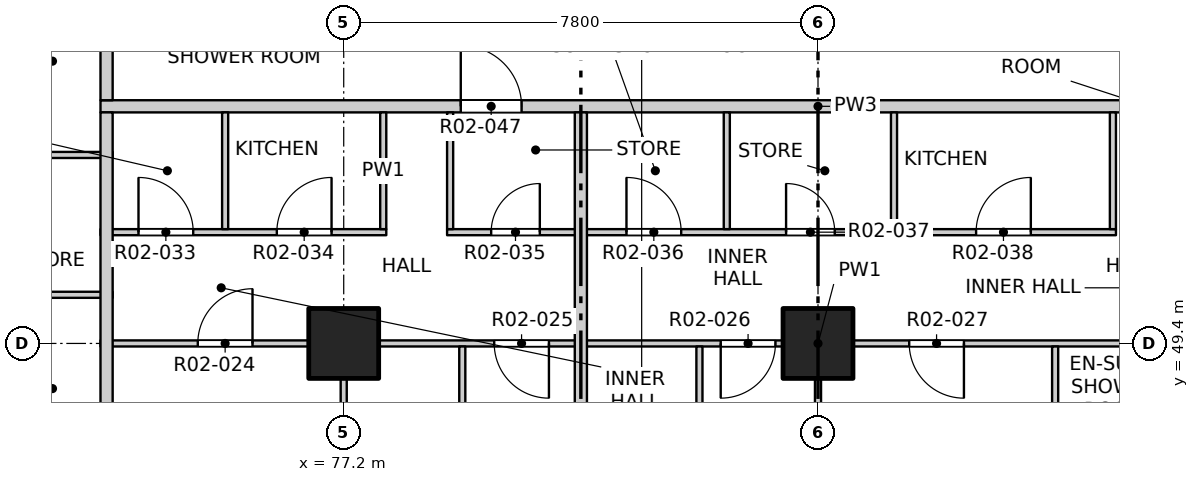
"""IFC4 building model, lengths in metres.
Left out: names, types, materials, properties, quantities, classifications, styles, units other than length and angle.
Written with IfcOpenShell. Run it as: python <this file> out.ifc"""

import sys

from ifc_helpers import new_model, si_unit, direction, frame, frame_2d, origin, origin_2d, place, context, subcontext, project, spatial, rectangle, extrude, element, fill, save


model = new_model("IFC4")
c1 = context("Model", 3, precision=1e-05, world=origin(), true_north=direction((0.0, 1.0)))
c2 = subcontext(c1, "Body", "Model", "MODEL_VIEW")
j1 = project(units=[si_unit("LENGTHUNIT", "METRE"), si_unit("PLANEANGLEUNIT", "RADIAN")], contexts=[c1])
p1 = place(None, origin())
s1 = spatial("IfcSite", under=j1, at=p1, CompositionType="ELEMENT")
p2 = place(p1, origin())
s2 = spatial("IfcBuilding", under=s1, at=p2, CompositionType="ELEMENT")
p3 = place(p2, frame((0.0, 0.0, 29.7)))
s3 = spatial("IfcBuildingStorey", under=s2, at=p3, CompositionType="ELEMENT", Elevation=29.7)
for number, where, z_axis, x_axis in (
    (1, (77.2, 49.4, -0.25), (0.0, 0.0, 1.0), (1.0, 0.0, 0.0)),
    (2, (85.0, 49.4, -0.25), (0.0, 0.0, 1.0), (1.0, 0.0, 0.0)),
):
    element("IfcColumn", number, at=place(p3, frame(where, z_axis=z_axis, x_axis=x_axis)), inside=s3, PredefinedType="COLUMN", context=c2, shape_type="SweptSolid", body=[
        extrude(rectangle(XDim=1.15, YDim=1.15, at=origin_2d()), origin(), (0.0, 0.0, 1.0), 3.4),
    ])
p4 = place(p3, frame((73.2, 49.4, 0.0), z_axis=(0.0, 0.0, 1.0), x_axis=(1.0, 0.0, 0.0)))
e3 = element("IfcWall", 3, at=p4, inside=s3, PredefinedType="PARTITIONING", context=c2, shape_type="SweptSolid", body=[
    extrude(rectangle(XDim=23.6, YDim=0.1, at=frame_2d((11.8, 0.0))), origin(), (0.0, 0.0, 1.0), 3.15),
])
p5 = place(p4, frame((1.6, 0.0, 0.0)))
e4 = element("IfcOpeningElement", 4, at=p5, cuts=e3, PredefinedType="OPENING", context=c2, shape_type="SweptSolid", body=[
    extrude(rectangle(XDim=0.9, YDim=2.1, at=frame_2d((0.45, 1.05))), frame((0.0, 0.06, 0.0), z_axis=(0.0, -1.0, 0.0), x_axis=(1.0, 0.0, 0.0)), (0.0, 0.0, 1.0), 0.12),
])
p6 = place(p4, frame((6.475, 0.0, 0.0)))
e5 = element("IfcOpeningElement", 5, at=p6, cuts=e3, PredefinedType="OPENING", context=c2, shape_type="SweptSolid", body=[
    extrude(rectangle(XDim=0.9, YDim=2.1, at=frame_2d((0.45, 1.05))), frame((0.0, 0.06, 0.0), z_axis=(0.0, -1.0, 0.0), x_axis=(1.0, 0.0, 0.0)), (0.0, 0.0, 1.0), 0.12),
])
p7 = place(p4, frame((10.2, 0.0, 0.0)))
e6 = element("IfcOpeningElement", 6, at=p7, cuts=e3, PredefinedType="OPENING", context=c2, shape_type="SweptSolid", body=[
    extrude(rectangle(XDim=0.9, YDim=2.1, at=frame_2d((0.45, 1.05))), frame((0.0, 0.06, 0.0), z_axis=(0.0, -1.0, 0.0), x_axis=(1.0, 0.0, 0.0)), (0.0, 0.0, 1.0), 0.12),
])
p8 = place(p4, frame((13.3, 0.0, 0.0)))
e7 = element("IfcOpeningElement", 7, at=p8, cuts=e3, PredefinedType="OPENING", context=c2, shape_type="SweptSolid", body=[
    extrude(rectangle(XDim=0.9, YDim=2.1, at=frame_2d((0.45, 1.05))), frame((0.0, 0.06, 0.0), z_axis=(0.0, -1.0, 0.0), x_axis=(1.0, 0.0, 0.0)), (0.0, 0.0, 1.0), 0.12),
])
p9 = place(p4, frame((18.0, 0.0, 0.0)))
e8 = element("IfcOpeningElement", 8, at=p9, cuts=e3, PredefinedType="OPENING", context=c2, shape_type="SweptSolid", body=[
    extrude(rectangle(XDim=0.9, YDim=2.1, at=frame_2d((0.45, 1.05))), frame((0.0, 0.06, 0.0), z_axis=(0.0, -1.0, 0.0), x_axis=(1.0, 0.0, 0.0)), (0.0, 0.0, 1.0), 0.12),
])
p10 = place(p4, frame((21.1, 0.0, 0.0)))
e9 = element("IfcOpeningElement", 9, at=p10, cuts=e3, PredefinedType="OPENING", context=c2, shape_type="SweptSolid", body=[
    extrude(rectangle(XDim=0.9, YDim=2.1, at=frame_2d((0.45, 1.05))), frame((0.0, 0.06, 0.0), z_axis=(0.0, -1.0, 0.0), x_axis=(1.0, 0.0, 0.0)), (0.0, 0.0, 1.0), 0.12),
])
p11 = place(p3, frame((71.18, 50.2, 0.0), z_axis=(0.0, 0.0, 1.0), x_axis=(1.0, 0.0, 0.0)))
e10 = element("IfcWall", 10, at=p11, inside=s3, PredefinedType="PARTITIONING", context=c2, shape_type="SweptSolid", body=[
    extrude(rectangle(XDim=2.22, YDim=0.1, at=frame_2d((1.11, 0.0))), origin(), (0.0, 0.0, 1.0), 3.15),
])
p12 = place(p3, frame((73.2, 51.23, 0.0), z_axis=(0.0, 0.0, 1.0), x_axis=(1.0, 0.0, 0.0)))
e11 = element("IfcWall", 11, at=p12, inside=s3, PredefinedType="PARTITIONING", context=c2, shape_type="SweptSolid", body=[
    extrude(rectangle(XDim=4.7, YDim=0.1, at=frame_2d((2.35, 0.0))), origin(), (0.0, 0.0, 1.0), 3.15),
])
p13 = place(p12, frame((0.625, 0.0, 0.0)))
e12 = element("IfcOpeningElement", 12, at=p13, cuts=e11, PredefinedType="OPENING", context=c2, shape_type="SweptSolid", body=[
    extrude(rectangle(XDim=0.9, YDim=2.1, at=frame_2d((0.45, 1.05))), frame((0.0, 0.06, 0.0), z_axis=(0.0, -1.0, 0.0), x_axis=(1.0, 0.0, 0.0)), (0.0, 0.0, 1.0), 0.12),
])
p14 = place(p12, frame((2.9, 0.0, 0.0)))
e13 = element("IfcOpeningElement", 13, at=p14, cuts=e11, PredefinedType="OPENING", context=c2, shape_type="SweptSolid", body=[
    extrude(rectangle(XDim=0.9, YDim=2.1, at=frame_2d((0.45, 1.05))), frame((0.0, 0.06, 0.0), z_axis=(0.0, -1.0, 0.0), x_axis=(1.0, 0.0, 0.0)), (0.0, 0.0, 1.0), 0.12),
])
p15 = place(p3, frame((78.9, 51.23, 0.0), z_axis=(0.0, 0.0, 1.0), x_axis=(1.0, 0.0, 0.0)))
e14 = element("IfcWall", 14, at=p15, inside=s3, PredefinedType="PARTITIONING", context=c2, shape_type="SweptSolid", body=[
    extrude(rectangle(XDim=11.0, YDim=0.1, at=frame_2d((5.5, 0.0))), origin(), (0.0, 0.0, 1.0), 3.15),
])
p16 = place(p15, frame((0.725, 0.0, 0.0)))
e15 = element("IfcOpeningElement", 15, at=p16, cuts=e14, PredefinedType="OPENING", context=c2, shape_type="SweptSolid", body=[
    extrude(rectangle(XDim=0.8, YDim=2.1, at=frame_2d((0.4, 1.05))), frame((0.0, 0.06, 0.0), z_axis=(0.0, -1.0, 0.0), x_axis=(1.0, 0.0, 0.0)), (0.0, 0.0, 1.0), 0.12),
])
p17 = place(p15, frame((2.95, 0.0, 0.0)))
e16 = element("IfcOpeningElement", 16, at=p17, cuts=e14, PredefinedType="OPENING", context=c2, shape_type="SweptSolid", body=[
    extrude(rectangle(XDim=0.9, YDim=2.1, at=frame_2d((0.45, 1.05))), frame((0.0, 0.06, 0.0), z_axis=(0.0, -1.0, 0.0), x_axis=(1.0, 0.0, 0.0)), (0.0, 0.0, 1.0), 0.12),
])
p18 = place(p15, frame((5.575, 0.0, 0.0)))
e17 = element("IfcOpeningElement", 17, at=p18, cuts=e14, PredefinedType="OPENING", context=c2, shape_type="SweptSolid", body=[
    extrude(rectangle(XDim=0.8, YDim=2.1, at=frame_2d((0.4, 1.05))), frame((0.0, 0.06, 0.0), z_axis=(0.0, -1.0, 0.0), x_axis=(1.0, 0.0, 0.0)), (0.0, 0.0, 1.0), 0.12),
])
p19 = place(p15, frame((8.7, 0.0, 0.0)))
e18 = element("IfcOpeningElement", 18, at=p19, cuts=e14, PredefinedType="OPENING", context=c2, shape_type="SweptSolid", body=[
    extrude(rectangle(XDim=0.9, YDim=2.1, at=frame_2d((0.45, 1.05))), frame((0.0, 0.06, 0.0), z_axis=(0.0, -1.0, 0.0), x_axis=(1.0, 0.0, 0.0)), (0.0, 0.0, 1.0), 0.12),
])
p20 = place(p3, frame((71.18, 52.5, 0.0), z_axis=(0.0, 0.0, 1.0), x_axis=(1.0, 0.0, 0.0)))
e19 = element("IfcWall", 19, at=p20, inside=s3, PredefinedType="PARTITIONING", context=c2, shape_type="SweptSolid", body=[
    extrude(rectangle(XDim=2.22, YDim=0.1, at=frame_2d((1.11, 0.0))), origin(), (0.0, 0.0, 1.0), 3.15),
])
p21 = place(p3, frame((73.2, 53.3, 0.0), z_axis=(0.0, 0.0, 1.0), x_axis=(1.0, 0.0, 0.0)))
e20 = element("IfcWall", 20, at=p21, inside=s3, PredefinedType="PARTITIONING", context=c2, shape_type="SweptSolid", body=[
    extrude(rectangle(XDim=23.6, YDim=0.2, at=frame_2d((11.8, 0.0))), origin(), (0.0, 0.0, 1.0), 3.15),
])
p22 = place(p21, frame((5.925, 0.0, 0.0)))
e21 = element("IfcOpeningElement", 21, at=p22, cuts=e20, PredefinedType="OPENING", context=c2, shape_type="SweptSolid", body=[
    extrude(rectangle(XDim=1.0, YDim=2.1, at=frame_2d((0.5, 1.05))), frame((0.0, 0.11, 0.0), z_axis=(0.0, -1.0, 0.0), x_axis=(1.0, 0.0, 0.0)), (0.0, 0.0, 1.0), 0.22),
])
p23 = place(p21, frame((17.925, 0.0, 0.0)))
e22 = element("IfcOpeningElement", 22, at=p23, cuts=e20, PredefinedType="OPENING", context=c2, shape_type="SweptSolid", body=[
    extrude(rectangle(XDim=1.0, YDim=2.1, at=frame_2d((0.5, 1.05))), frame((0.0, 0.11, 0.0), z_axis=(0.0, -1.0, 0.0), x_axis=(1.0, 0.0, 0.0)), (0.0, 0.0, 1.0), 0.22),
])
p24 = place(p3, frame((73.3, 41.9, 0.0), z_axis=(0.0, 0.0, 1.0), x_axis=(0.0, 1.0, 0.0)))
e23 = element("IfcWall", 23, at=p24, inside=s3, PredefinedType="PARTITIONING", context=c2, shape_type="SweptSolid", body=[
    extrude(rectangle(XDim=11.3, YDim=0.2, at=frame_2d((5.65, 0.0))), origin(), (0.0, 0.0, 1.0), 3.15),
])
p25 = place(p3, frame((73.3, 53.4, 0.0), z_axis=(0.0, 0.0, 1.0), x_axis=(0.0, 1.0, 0.0)))
e24 = element("IfcWall", 24, at=p25, inside=s3, PredefinedType="PARTITIONING", context=c2, shape_type="SweptSolid", body=[
    extrude(rectangle(XDim=31.0, YDim=0.2, at=frame_2d((15.5, 0.0))), origin(), (0.0, 0.0, 1.0), 3.15),
])
p26 = place(p25, frame((2.675, 0.0, 0.0)))
e25 = element("IfcOpeningElement", 25, at=p26, cuts=e24, PredefinedType="OPENING", context=c2, shape_type="SweptSolid", body=[
    extrude(rectangle(XDim=1.0, YDim=2.1, at=frame_2d((0.5, 1.05))), frame((0.0, 0.11, 0.0), z_axis=(0.0, -1.0, 0.0), x_axis=(1.0, 0.0, 0.0)), (0.0, 0.0, 1.0), 0.22),
])
p27 = place(p25, frame((18.125, 0.0, 0.0)))
e26 = element("IfcOpeningElement", 26, at=p27, cuts=e24, PredefinedType="OPENING", context=c2, shape_type="SweptSolid", body=[
    extrude(rectangle(XDim=1.0, YDim=2.1, at=frame_2d((0.5, 1.05))), frame((0.0, 0.11, 0.0), z_axis=(0.0, -1.0, 0.0), x_axis=(1.0, 0.0, 0.0)), (0.0, 0.0, 1.0), 0.22),
])
p28 = place(p25, frame((26.025, 0.0, 0.0)))
e27 = element("IfcOpeningElement", 27, at=p28, cuts=e24, PredefinedType="OPENING", context=c2, shape_type="SweptSolid", body=[
    extrude(rectangle(XDim=1.0, YDim=2.1, at=frame_2d((0.5, 1.05))), frame((0.0, 0.11, 0.0), z_axis=(0.0, -1.0, 0.0), x_axis=(1.0, 0.0, 0.0)), (0.0, 0.0, 1.0), 0.22),
])
p29 = place(p3, frame((75.25, 51.28, 0.0), z_axis=(0.0, 0.0, 1.0), x_axis=(0.0, 1.0, 0.0)))
e28 = element("IfcWall", 28, at=p29, inside=s3, PredefinedType="PARTITIONING", context=c2, shape_type="SweptSolid", body=[
    extrude(rectangle(XDim=1.92, YDim=0.1, at=frame_2d((0.96, 0.0))), origin(), (0.0, 0.0, 1.0), 3.15),
])
p30 = place(p3, frame((77.2, 41.9, 0.0), z_axis=(0.0, 0.0, 1.0), x_axis=(0.0, 1.0, 0.0)))
e29 = element("IfcWall", 29, at=p30, inside=s3, PredefinedType="PARTITIONING", context=c2, shape_type="SweptSolid", body=[
    extrude(rectangle(XDim=7.45, YDim=0.1, at=frame_2d((3.725, 0.0))), origin(), (0.0, 0.0, 1.0), 2.55),
])
for number, where, z_axis, x_axis in (
    (30, (77.85, 51.28, 0.0), (0.0, 0.0, 1.0), (0.0, 1.0, 0.0)),
    (31, (78.95, 51.28, 0.0), (0.0, 0.0, 1.0), (0.0, 1.0, 0.0)),
):
    element("IfcWall", number, at=place(p3, frame(where, z_axis=z_axis, x_axis=x_axis)), inside=s3, PredefinedType="PARTITIONING", context=c2, shape_type="SweptSolid", body=[
        extrude(rectangle(XDim=1.92, YDim=0.1, at=frame_2d((0.96, 0.0))), origin(), (0.0, 0.0, 1.0), 3.15),
    ])
p31 = place(p3, frame((79.15, 45.85, 0.0), z_axis=(0.0, 0.0, 1.0), x_axis=(0.0, 1.0, 0.0)))
e32 = element("IfcWall", 32, at=p31, inside=s3, PredefinedType="PARTITIONING", context=c2, shape_type="SweptSolid", body=[
    extrude(rectangle(XDim=3.5, YDim=0.1, at=frame_2d((1.75, 0.0))), origin(), (0.0, 0.0, 1.0), 3.15),
])
p32 = place(p3, frame((81.1, 41.9, 0.0), z_axis=(0.0, 0.0, 1.0), x_axis=(0.0, 1.0, 0.0)))
e33 = element("IfcWall", 33, at=p32, inside=s3, PredefinedType="PARTITIONING", context=c2, shape_type="SweptSolid", body=[
    extrude(rectangle(XDim=11.3, YDim=0.2, at=frame_2d((5.65, 0.0))), origin(), (0.0, 0.0, 1.0), 3.15),
])
p33 = place(p3, frame((83.05, 46.0, 0.0), z_axis=(0.0, 0.0, 1.0), x_axis=(0.0, 1.0, 0.0)))
e34 = element("IfcWall", 34, at=p33, inside=s3, PredefinedType="PARTITIONING", context=c2, shape_type="SweptSolid", body=[
    extrude(rectangle(XDim=3.35, YDim=0.1, at=frame_2d((1.675, 0.0))), origin(), (0.0, 0.0, 1.0), 3.15),
])
p34 = place(p3, frame((83.5, 51.28, 0.0), z_axis=(0.0, 0.0, 1.0), x_axis=(0.0, 1.0, 0.0)))
e35 = element("IfcWall", 35, at=p34, inside=s3, PredefinedType="PARTITIONING", context=c2, shape_type="SweptSolid", body=[
    extrude(rectangle(XDim=1.92, YDim=0.1, at=frame_2d((0.96, 0.0))), origin(), (0.0, 0.0, 1.0), 3.15),
])
p35 = place(p3, frame((85.0, 41.9, 0.0), z_axis=(0.0, 0.0, 1.0), x_axis=(0.0, 1.0, 0.0)))
e36 = element("IfcWall", 36, at=p35, inside=s3, PredefinedType="PARTITIONING", context=c2, shape_type="SweptSolid", body=[
    extrude(rectangle(XDim=7.45, YDim=0.1, at=frame_2d((3.725, 0.0))), origin(), (0.0, 0.0, 1.0), 2.55),
])
p36 = place(p3, frame((86.25, 51.28, 0.0), z_axis=(0.0, 0.0, 1.0), x_axis=(0.0, 1.0, 0.0)))
e37 = element("IfcWall", 37, at=p36, inside=s3, PredefinedType="PARTITIONING", context=c2, shape_type="SweptSolid", body=[
    extrude(rectangle(XDim=1.92, YDim=0.1, at=frame_2d((0.96, 0.0))), origin(), (0.0, 0.0, 1.0), 3.15),
])
p37 = place(p3, frame((88.9, 41.9, 0.0), z_axis=(0.0, 0.0, 1.0), x_axis=(0.0, 1.0, 0.0)))
e38 = element("IfcWall", 38, at=p37, inside=s3, PredefinedType="PARTITIONING", context=c2, shape_type="SweptSolid", body=[
    extrude(rectangle(XDim=7.45, YDim=0.1, at=frame_2d((3.725, 0.0))), origin(), (0.0, 0.0, 1.0), 3.15),
])
p38 = place(p3, frame((89.85, 51.28, 0.0), z_axis=(0.0, 0.0, 1.0), x_axis=(0.0, 1.0, 0.0)))
e39 = element("IfcWall", 39, at=p38, inside=s3, PredefinedType="PARTITIONING", context=c2, shape_type="SweptSolid", body=[
    extrude(rectangle(XDim=1.92, YDim=0.1, at=frame_2d((0.96, 0.0))), origin(), (0.0, 0.0, 1.0), 3.15),
])
p39 = place(p5, origin())
e40 = element("IfcDoor", 40, at=p39, inside=s3, OperationType="SINGLE_SWING_RIGHT", PredefinedType="DOOR", context=c2, shape_type="SweptSolid", body=[
    extrude(rectangle(XDim=0.9, YDim=2.1, at=frame_2d((0.45, 1.05))), frame((0.0, 0.025, 0.0), z_axis=(0.0, -1.0, 0.0), x_axis=(1.0, 0.0, 0.0)), (0.0, 0.0, 1.0), 0.05),
])
fill(e4, e40)
p40 = place(p6, origin())
e41 = element("IfcDoor", 41, at=p40, inside=s3, OperationType="SINGLE_SWING_LEFT", PredefinedType="DOOR", context=c2, shape_type="SweptSolid", body=[
    extrude(rectangle(XDim=0.9, YDim=2.1, at=frame_2d((0.45, 1.05))), frame((0.0, 0.025, 0.0), z_axis=(0.0, -1.0, 0.0), x_axis=(1.0, 0.0, 0.0)), (0.0, 0.0, 1.0), 0.05),
])
fill(e5, e41)
p41 = place(p7, origin())
e42 = element("IfcDoor", 42, at=p41, inside=s3, OperationType="SINGLE_SWING_RIGHT", PredefinedType="DOOR", context=c2, shape_type="SweptSolid", body=[
    extrude(rectangle(XDim=0.9, YDim=2.1, at=frame_2d((0.45, 1.05))), frame((0.0, 0.025, 0.0), z_axis=(0.0, -1.0, 0.0), x_axis=(1.0, 0.0, 0.0)), (0.0, 0.0, 1.0), 0.05),
])
fill(e6, e42)
p42 = place(p8, origin())
e43 = element("IfcDoor", 43, at=p42, inside=s3, OperationType="SINGLE_SWING_LEFT", PredefinedType="DOOR", context=c2, shape_type="SweptSolid", body=[
    extrude(rectangle(XDim=0.9, YDim=2.1, at=frame_2d((0.45, 1.05))), frame((0.0, 0.025, 0.0), z_axis=(0.0, -1.0, 0.0), x_axis=(1.0, 0.0, 0.0)), (0.0, 0.0, 1.0), 0.05),
])
fill(e7, e43)
p43 = place(p13, origin())
e44 = element("IfcDoor", 44, at=p43, inside=s3, OperationType="SINGLE_SWING_LEFT", PredefinedType="DOOR", context=c2, shape_type="SweptSolid", body=[
    extrude(rectangle(XDim=0.9, YDim=2.1, at=frame_2d((0.45, 1.05))), frame((0.0, 0.025, 0.0), z_axis=(0.0, -1.0, 0.0), x_axis=(1.0, 0.0, 0.0)), (0.0, 0.0, 1.0), 0.05),
])
fill(e12, e44)
p44 = place(p14, origin())
e45 = element("IfcDoor", 45, at=p44, inside=s3, OperationType="SINGLE_SWING_RIGHT", PredefinedType="DOOR", context=c2, shape_type="SweptSolid", body=[
    extrude(rectangle(XDim=0.9, YDim=2.1, at=frame_2d((0.45, 1.05))), frame((0.0, 0.025, 0.0), z_axis=(0.0, -1.0, 0.0), x_axis=(1.0, 0.0, 0.0)), (0.0, 0.0, 1.0), 0.05),
])
fill(e13, e45)
p45 = place(p16, origin())
e46 = element("IfcDoor", 46, at=p45, inside=s3, OperationType="SINGLE_SWING_RIGHT", PredefinedType="DOOR", context=c2, shape_type="SweptSolid", body=[
    extrude(rectangle(XDim=0.8, YDim=2.1, at=frame_2d((0.4, 1.05))), frame((0.0, 0.025, 0.0), z_axis=(0.0, -1.0, 0.0), x_axis=(1.0, 0.0, 0.0)), (0.0, 0.0, 1.0), 0.05),
])
fill(e15, e46)
p46 = place(p17, origin())
e47 = element("IfcDoor", 47, at=p46, inside=s3, OperationType="SINGLE_SWING_LEFT", PredefinedType="DOOR", context=c2, shape_type="SweptSolid", body=[
    extrude(rectangle(XDim=0.9, YDim=2.1, at=frame_2d((0.45, 1.05))), frame((0.0, 0.025, 0.0), z_axis=(0.0, -1.0, 0.0), x_axis=(1.0, 0.0, 0.0)), (0.0, 0.0, 1.0), 0.05),
])
fill(e16, e47)
p47 = place(p18, origin())
e48 = element("IfcDoor", 48, at=p47, inside=s3, OperationType="SINGLE_SWING_LEFT", PredefinedType="DOOR", context=c2, shape_type="SweptSolid", body=[
    extrude(rectangle(XDim=0.8, YDim=2.1, at=frame_2d((0.4, 1.05))), frame((0.0, 0.025, 0.0), z_axis=(0.0, -1.0, 0.0), x_axis=(1.0, 0.0, 0.0)), (0.0, 0.0, 1.0), 0.05),
])
fill(e17, e48)
p48 = place(p19, origin())
e49 = element("IfcDoor", 49, at=p48, inside=s3, OperationType="SINGLE_SWING_RIGHT", PredefinedType="DOOR", context=c2, shape_type="SweptSolid", body=[
    extrude(rectangle(XDim=0.9, YDim=2.1, at=frame_2d((0.45, 1.05))), frame((0.0, 0.025, 0.0), z_axis=(0.0, -1.0, 0.0), x_axis=(1.0, 0.0, 0.0)), (0.0, 0.0, 1.0), 0.05),
])
fill(e18, e49)
p49 = place(p22, origin())
e50 = element("IfcDoor", 50, at=p49, inside=s3, OperationType="SINGLE_SWING_LEFT", PredefinedType="DOOR", context=c2, shape_type="SweptSolid", body=[
    extrude(rectangle(XDim=1.0, YDim=2.1, at=frame_2d((0.5, 1.05))), frame((0.0, 0.025, 0.0), z_axis=(0.0, -1.0, 0.0), x_axis=(1.0, 0.0, 0.0)), (0.0, 0.0, 1.0), 0.05),
])
fill(e21, e50)
save(model, sys.argv[1])
